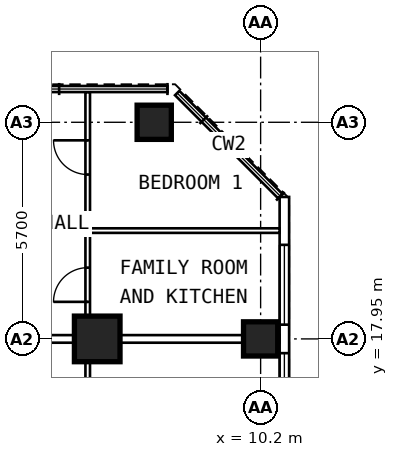
"""IFC4 building model, lengths in metres.
Left out: names, types, materials, properties, quantities, classifications, styles, units other than length and angle.
Written with IfcOpenShell. Run it as: python <this file> out.ifc"""

import sys

from ifc_helpers import new_model, si_unit, direction, frame, frame_2d, origin, origin_2d, place, context, subcontext, project, spatial, rectangle, extrude, element, fill, save


model = new_model("IFC4")
c1 = context("Model", 3, precision=1e-05, world=origin(), true_north=direction((0.0, 1.0)))
c2 = subcontext(c1, "Body", "Model", "MODEL_VIEW")
j1 = project(units=[si_unit("LENGTHUNIT", "METRE"), si_unit("PLANEANGLEUNIT", "RADIAN")], contexts=[c1])
p1 = place(None, origin())
s1 = spatial("IfcSite", under=j1, at=p1, CompositionType="ELEMENT")
p2 = place(p1, origin())
s2 = spatial("IfcBuilding", under=s1, at=p2, CompositionType="ELEMENT")
p3 = place(p2, frame((0.0, 0.0, 138.2)))
s3 = spatial("IfcBuildingStorey", under=s2, at=p3, CompositionType="ELEMENT", Elevation=138.2)
for number, where, z_axis, x_axis in (
    (1, (10.2, 17.95, 0.0), (0.0, 0.0, 1.0), (0.0, 1.0, 0.0)),
    (2, (7.4, 23.65, 0.0), (0.0, 0.0, 1.0), (0.0, 1.0, 0.0)),
):
    element("IfcColumn", number, at=place(p3, frame(where, z_axis=z_axis, x_axis=x_axis)), inside=s3, PredefinedType="COLUMN", context=c2, shape_type="SweptSolid", body=[
        extrude(rectangle(XDim=0.9, YDim=0.9, at=origin_2d()), origin(), (0.0, 0.0, 1.0), 3.6),
    ])
p4 = place(p3, frame((5.9, 17.95, 0.0), z_axis=(0.0, 0.0, 1.0), x_axis=(0.0, 1.0, 0.0)))
e3 = element("IfcColumn", 3, at=p4, inside=s3, PredefinedType="COLUMN", context=c2, shape_type="SweptSolid", body=[
    extrude(rectangle(XDim=1.2, YDim=1.2, at=origin_2d()), origin(), (0.0, 0.0, 1.0), 3.6),
])
p5 = place(p3, frame((10.825, 6.409, 0.0), z_axis=(0.0, 0.0, 1.0), x_axis=(0.0, 1.0, 0.0)))
e4 = element("IfcWall", 4, at=p5, inside=s3, PredefinedType="SOLIDWALL", context=c2, shape_type="SweptSolid", body=[
    extrude(rectangle(XDim=15.276, YDim=0.25, at=frame_2d((7.638, 0.0))), origin(), (0.0, 0.0, 1.0), 3.35),
])
p6 = place(p5, frame((0.516, 0.0, 0.8)))
e5 = element("IfcOpeningElement", 5, at=p6, cuts=e4, PredefinedType="OPENING", context=c2, shape_type="SweptSolid", body=[
    extrude(rectangle(XDim=2.1, YDim=1.8, at=frame_2d((1.05, 0.9))), frame((0.0, 0.137, 0.0), z_axis=(0.0, -1.0, 0.0), x_axis=(1.0, 0.0, 0.0)), (0.0, 0.0, 1.0), 0.274),
])
p7 = place(p5, frame((3.366, 0.0, 0.8)))
e6 = element("IfcOpeningElement", 6, at=p7, cuts=e4, PredefinedType="OPENING", context=c2, shape_type="SweptSolid", body=[
    extrude(rectangle(XDim=2.1, YDim=1.8, at=frame_2d((1.05, 0.9))), frame((0.0, 0.137, 0.0), z_axis=(0.0, -1.0, 0.0), x_axis=(1.0, 0.0, 0.0)), (0.0, 0.0, 1.0), 0.274),
])
p8 = place(p5, frame((6.216, 0.0, 0.8)))
e7 = element("IfcOpeningElement", 7, at=p8, cuts=e4, PredefinedType="OPENING", context=c2, shape_type="SweptSolid", body=[
    extrude(rectangle(XDim=2.1, YDim=1.8, at=frame_2d((1.05, 0.9))), frame((0.0, 0.137, 0.0), z_axis=(0.0, -1.0, 0.0), x_axis=(1.0, 0.0, 0.0)), (0.0, 0.0, 1.0), 0.274),
])
p9 = place(p5, frame((9.066, 0.0, 0.8)))
e8 = element("IfcOpeningElement", 8, at=p9, cuts=e4, PredefinedType="OPENING", context=c2, shape_type="SweptSolid", body=[
    extrude(rectangle(XDim=2.1, YDim=1.8, at=frame_2d((1.05, 0.9))), frame((0.0, 0.137, 0.0), z_axis=(0.0, -1.0, 0.0), x_axis=(1.0, 0.0, 0.0)), (0.0, 0.0, 1.0), 0.274),
])
p10 = place(p5, frame((11.916, 0.0, 0.8)))
e9 = element("IfcOpeningElement", 9, at=p10, cuts=e4, PredefinedType="OPENING", context=c2, shape_type="SweptSolid", body=[
    extrude(rectangle(XDim=2.1, YDim=1.8, at=frame_2d((1.05, 0.9))), frame((0.0, 0.137, 0.0), z_axis=(0.0, -1.0, 0.0), x_axis=(1.0, 0.0, 0.0)), (0.0, 0.0, 1.0), 0.274),
])
p11 = place(p3, frame((5.65, 9.6, 0.0), z_axis=(0.0, 0.0, 1.0), x_axis=(0.0, 1.0, 0.0)))
e10 = element("IfcWall", 10, at=p11, inside=s3, PredefinedType="PARTITIONING", context=c2, shape_type="SweptSolid", body=[
    extrude(rectangle(XDim=8.1, YDim=0.12, at=frame_2d((4.05, 0.0))), origin(), (0.0, 0.0, 1.0), 3.35),
])
p12 = place(p11, frame((5.05, 0.0, 0.0)))
e11 = element("IfcOpeningElement", 11, at=p12, cuts=e10, PredefinedType="OPENING", context=c2, shape_type="SweptSolid", body=[
    extrude(rectangle(XDim=0.9, YDim=2.1, at=frame_2d((0.45, 1.05))), frame((0.0, 0.072, 0.0), z_axis=(0.0, -1.0, 0.0), x_axis=(1.0, 0.0, 0.0)), (0.0, 0.0, 1.0), 0.144),
])
p13 = place(p3, frame((5.65, 18.05, 0.0), z_axis=(0.0, 0.0, 1.0), x_axis=(0.0, 1.0, 0.0)))
e12 = element("IfcWall", 12, at=p13, inside=s3, PredefinedType="PARTITIONING", context=c2, shape_type="SweptSolid", body=[
    extrude(rectangle(XDim=6.395, YDim=0.12, at=frame_2d((3.198, 0.0))), origin(), (0.0, 0.0, 1.0), 3.35),
])
p14 = place(p13, frame((0.875, 0.0, 0.0)))
e13 = element("IfcOpeningElement", 13, at=p14, cuts=e12, PredefinedType="OPENING", context=c2, shape_type="SweptSolid", body=[
    extrude(rectangle(XDim=0.9, YDim=2.1, at=frame_2d((0.45, 1.05))), frame((0.0, 0.072, 0.0), z_axis=(0.0, -1.0, 0.0), x_axis=(1.0, 0.0, 0.0)), (0.0, 0.0, 1.0), 0.144),
])
p15 = place(p13, frame((4.225, 0.0, 0.0)))
e14 = element("IfcOpeningElement", 14, at=p15, cuts=e12, PredefinedType="OPENING", context=c2, shape_type="SweptSolid", body=[
    extrude(rectangle(XDim=0.9, YDim=2.1, at=frame_2d((0.45, 1.05))), frame((0.0, 0.072, 0.0), z_axis=(0.0, -1.0, 0.0), x_axis=(1.0, 0.0, 0.0)), (0.0, 0.0, 1.0), 0.144),
])
p16 = place(p3, frame((5.71, 20.8, 0.0), z_axis=(0.0, 0.0, 1.0), x_axis=(1.0, 0.0, 0.0)))
e15 = element("IfcWall", 15, at=p16, inside=s3, PredefinedType="PARTITIONING", context=c2, shape_type="SweptSolid", body=[
    extrude(rectangle(XDim=4.99, YDim=0.12, at=frame_2d((2.495, 0.0))), origin(), (0.0, 0.0, 1.0), 3.35),
])
p17 = place(p3, frame((2.0, 17.95, 0.0), z_axis=(0.0, 0.0, 1.0), x_axis=(1.0, 0.0, 0.0)))
e16 = element("IfcWall", 16, at=p17, inside=s3, PredefinedType="PARTITIONING", context=c2, shape_type="SweptSolid", body=[
    extrude(rectangle(XDim=8.7, YDim=0.2, at=frame_2d((4.35, 0.0))), origin(), (0.0, 0.0, 1.0), 2.45),
])
p18 = place(p9, origin())
e17 = element("IfcWindow", 17, at=p18, inside=s3, PartitioningType="SINGLE_PANEL", PredefinedType="WINDOW", context=c2, shape_type="SweptSolid", body=[
    extrude(rectangle(XDim=2.1, YDim=1.8, at=frame_2d((1.05, 0.9))), frame((0.0, 0.03, 0.0), z_axis=(0.0, -1.0, 0.0), x_axis=(1.0, 0.0, 0.0)), (0.0, 0.0, 1.0), 0.06),
])
fill(e8, e17)
p19 = place(p10, origin())
e18 = element("IfcWindow", 18, at=p19, inside=s3, PartitioningType="SINGLE_PANEL", PredefinedType="WINDOW", context=c2, shape_type="SweptSolid", body=[
    extrude(rectangle(XDim=2.1, YDim=1.8, at=frame_2d((1.05, 0.9))), frame((0.0, 0.03, 0.0), z_axis=(0.0, -1.0, 0.0), x_axis=(1.0, 0.0, 0.0)), (0.0, 0.0, 1.0), 0.06),
])
fill(e9, e18)
p20 = place(p14, origin())
e19 = element("IfcDoor", 19, at=p20, inside=s3, OperationType="SINGLE_SWING_LEFT", PredefinedType="DOOR", context=c2, shape_type="SweptSolid", body=[
    extrude(rectangle(XDim=0.9, YDim=2.1, at=frame_2d((0.45, 1.05))), frame((0.0, 0.025, 0.0), z_axis=(0.0, -1.0, 0.0), x_axis=(1.0, 0.0, 0.0)), (0.0, 0.0, 1.0), 0.05),
])
fill(e13, e19)
p21 = place(p15, origin())
e20 = element("IfcDoor", 20, at=p21, inside=s3, OperationType="SINGLE_SWING_RIGHT", PredefinedType="DOOR", context=c2, shape_type="SweptSolid", body=[
    extrude(rectangle(XDim=0.9, YDim=2.1, at=frame_2d((0.45, 1.05))), frame((0.0, 0.025, 0.0), z_axis=(0.0, -1.0, 0.0), x_axis=(1.0, 0.0, 0.0)), (0.0, 0.0, 1.0), 0.05),
])
fill(e14, e20)
save(model, sys.argv[1])
